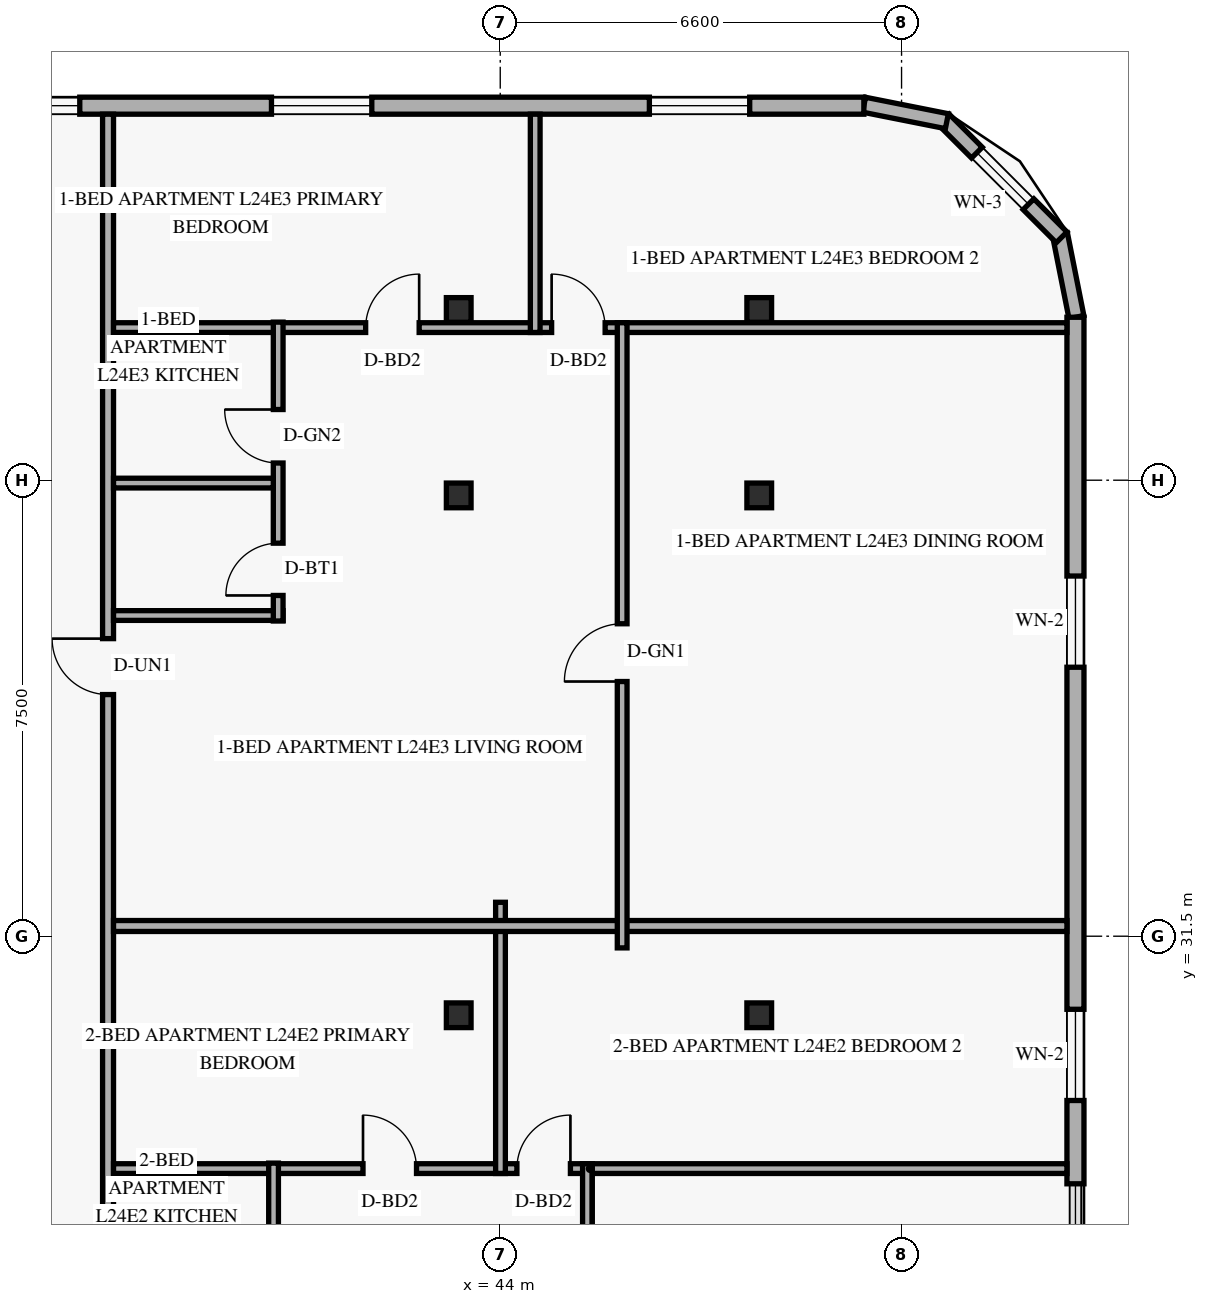
"""IFC4 building model, lengths in metres.
Left out: names, types, materials, properties, quantities, classifications, styles, units other than length and angle.
Written with IfcOpenShell. Run it as: python <this file> out.ifc"""

import sys

from ifc_helpers import new_model, si_unit, direction, frame, frame_2d, origin, origin_2d, place, context, subcontext, project, spatial, rectangle, hollow_rectangle, extrude, element, fill, save


model = new_model("IFC4")
c1 = context("Model", 3, precision=1e-05, world=origin(), true_north=direction((0.0, 1.0)))
c2 = subcontext(c1, "Body", "Model", "MODEL_VIEW")
j1 = project(units=[si_unit("LENGTHUNIT", "METRE"), si_unit("PLANEANGLEUNIT", "RADIAN")], contexts=[c1])
p1 = place(None, origin())
s1 = spatial("IfcSite", under=j1, at=p1, CompositionType="ELEMENT")
p2 = place(p1, origin())
s2 = spatial("IfcBuilding", under=s1, at=p2, CompositionType="ELEMENT")
p3 = place(p2, frame((0.0, 0.0, 94.8)))
s3 = spatial("IfcBuildingStorey", under=s2, at=p3, CompositionType="ELEMENT", Elevation=94.8)
for number, where, z_axis, x_axis in (
    (1, (43.254, 30.2, 0.0), (0.035, 0.0, 0.999), (0.0, 1.0, 0.0)),
    (2, (43.254, 38.75, 0.0), (0.035, 0.0, 0.999), (0.0, 1.0, 0.0)),
    (3, (43.254, 41.8, 0.0), (0.035, 0.0, 0.999), (0.0, 1.0, 0.0)),
):
    element("IfcColumn", number, at=place(p3, frame(where, z_axis=z_axis, x_axis=x_axis)), inside=s3, PredefinedType="COLUMN", context=c2, shape_type="SweptSolid", body=[
        extrude(hollow_rectangle(XDim=0.406, YDim=0.406, WallThickness=0.016, at=origin_2d()), origin(), (0.0, 0.0, 1.0), 3.602),
    ])
for number, where, z_axis, x_axis in (
    (4, (48.155, 30.2, 0.0), (0.058, 0.0, 0.998), (0.0, 1.0, 0.0)),
    (5, (48.155, 38.75, 0.0), (0.058, 0.0, 0.998), (0.0, 1.0, 0.0)),
    (6, (48.155, 41.8, 0.0), (0.058, 0.0, 0.998), (0.0, 1.0, 0.0)),
):
    element("IfcColumn", number, at=place(p3, frame(where, z_axis=z_axis, x_axis=x_axis)), inside=s3, PredefinedType="COLUMN", context=c2, shape_type="SweptSolid", body=[
        extrude(hollow_rectangle(XDim=0.406, YDim=0.406, WallThickness=0.016, at=origin_2d()), origin(), (0.0, 0.0, 1.0), 3.606),
    ])
p4 = place(p3, frame((53.476, 41.684, 0.0), z_axis=(0.0, 0.0, 1.0), x_axis=(-0.195000137217, 0.980803214965, 0.0)))
e7 = element("IfcWall", 7, at=p4, inside=s3, PredefinedType="SOLIDWALL", context=c2, shape_type="SweptSolid", body=[
    extrude(rectangle(XDim=1.388, YDim=0.25, at=frame_2d((0.694, 0.0))), origin(), (0.0, 0.0, 1.0), 3.35),
])
p5 = place(p3, frame((53.232, 42.995, 0.0), z_axis=(0.0, 0.0, 1.0), x_axis=(-0.707151344399, 0.707062215165, 0.0)))
e8 = element("IfcWall", 8, at=p5, inside=s3, PredefinedType="SOLIDWALL", context=c2, shape_type="SweptSolid", body=[
    extrude(rectangle(XDim=2.739, YDim=0.25, at=frame_2d((1.37, 0.0))), origin(), (0.0, 0.0, 1.0), 3.35),
])
p6 = place(p5, frame((0.77, 0.0, 0.85)))
e9 = element("IfcOpeningElement", 9, at=p6, cuts=e8, PredefinedType="OPENING", context=c2, shape_type="SweptSolid", body=[
    extrude(rectangle(XDim=1.2, YDim=1.5, at=frame_2d((0.6, 0.75))), frame((0.0, 0.135, 0.0), z_axis=(0.0, -1.0, 0.0), x_axis=(1.0, 0.0, 0.0)), (0.0, 0.0, 1.0), 0.27),
])
p7 = place(p3, frame((51.345, 44.905, 0.0), z_axis=(0.0, 0.0, 1.0), x_axis=(-0.980809899341, 0.19496651342, 0.0)))
e10 = element("IfcWall", 10, at=p7, inside=s3, PredefinedType="SOLIDWALL", context=c2, shape_type="SweptSolid", body=[
    extrude(rectangle(XDim=1.389, YDim=0.25, at=frame_2d((0.694, 0.0))), origin(), (0.0, 0.0, 1.0), 3.35),
])
p8 = place(p3, frame((53.46, 27.428, 0.0), z_axis=(0.0, 0.0, 1.0), x_axis=(0.0, 1.0, 0.0)))
e11 = element("IfcWall", 11, at=p8, inside=s3, PredefinedType="SOLIDWALL", context=c2, shape_type="SweptSolid", body=[
    extrude(rectangle(XDim=14.252, YDim=0.28, at=frame_2d((7.126, 0.0))), origin(), (0.0, 0.0, 1.0), 3.35),
])
p9 = place(p8, frame((1.37, 0.0, 0.85)))
e12 = element("IfcOpeningElement", 12, at=p9, cuts=e11, PredefinedType="OPENING", context=c2, shape_type="SweptSolid", body=[
    extrude(rectangle(XDim=1.5, YDim=1.55, at=frame_2d((0.75, 0.775))), frame((0.0, 0.15, 0.0), z_axis=(0.0, -1.0, 0.0), x_axis=(1.0, 0.0, 0.0)), (0.0, 0.0, 1.0), 0.3),
])
p10 = place(p8, frame((8.496, 0.0, 0.85)))
e13 = element("IfcOpeningElement", 13, at=p10, cuts=e11, PredefinedType="OPENING", context=c2, shape_type="SweptSolid", body=[
    extrude(rectangle(XDim=1.5, YDim=1.55, at=frame_2d((0.75, 0.775))), frame((0.0, 0.15, 0.0), z_axis=(0.0, -1.0, 0.0), x_axis=(1.0, 0.0, 0.0)), (0.0, 0.0, 1.0), 0.3),
])
p11 = place(p3, frame((49.98, 45.16, 0.0), z_axis=(0.0, 0.0, 1.0), x_axis=(-1.0, 0.0, 0.0)))
e14 = element("IfcWall", 14, at=p11, inside=s3, PredefinedType="SOLIDWALL", context=c2, shape_type="SweptSolid", body=[
    extrude(rectangle(XDim=36.56, YDim=0.28, at=frame_2d((18.28, 0.0))), origin(), (0.0, 0.0, 1.0), 3.35),
])
p12 = place(p11, frame((31.62, 0.0, 0.85)))
e15 = element("IfcOpeningElement", 15, at=p12, cuts=e14, PredefinedType="OPENING", context=c2, shape_type="SweptSolid", body=[
    extrude(rectangle(XDim=1.65, YDim=1.6, at=frame_2d((0.825, 0.8))), frame((0.0, 0.15, 0.0), z_axis=(0.0, -1.0, 0.0), x_axis=(1.0, 0.0, 0.0)), (0.0, 0.0, 1.0), 0.3),
])
p13 = place(p11, frame((26.68, 0.0, 0.85)))
e16 = element("IfcOpeningElement", 16, at=p13, cuts=e14, PredefinedType="OPENING", context=c2, shape_type="SweptSolid", body=[
    extrude(rectangle(XDim=1.2, YDim=1.5, at=frame_2d((0.6, 0.75))), frame((0.0, 0.15, 0.0), z_axis=(0.0, -1.0, 0.0), x_axis=(1.0, 0.0, 0.0)), (0.0, 0.0, 1.0), 0.3),
])
p14 = place(p11, frame((22.312, 0.0, 0.85)))
e17 = element("IfcOpeningElement", 17, at=p14, cuts=e14, PredefinedType="OPENING", context=c2, shape_type="SweptSolid", body=[
    extrude(rectangle(XDim=1.65, YDim=1.6, at=frame_2d((0.825, 0.8))), frame((0.0, 0.15, 0.0), z_axis=(0.0, -1.0, 0.0), x_axis=(1.0, 0.0, 0.0)), (0.0, 0.0, 1.0), 0.3),
])
p15 = place(p11, frame((16.477, 0.0, 0.85)))
e18 = element("IfcOpeningElement", 18, at=p15, cuts=e14, PredefinedType="OPENING", context=c2, shape_type="SweptSolid", body=[
    extrude(rectangle(XDim=1.65, YDim=1.6, at=frame_2d((0.825, 0.8))), frame((0.0, 0.15, 0.0), z_axis=(0.0, -1.0, 0.0), x_axis=(1.0, 0.0, 0.0)), (0.0, 0.0, 1.0), 0.3),
])
p16 = place(p11, frame((12.895, 0.0, 0.85)))
e19 = element("IfcOpeningElement", 19, at=p16, cuts=e14, PredefinedType="OPENING", context=c2, shape_type="SweptSolid", body=[
    extrude(rectangle(XDim=1.2, YDim=1.5, at=frame_2d((0.6, 0.75))), frame((0.0, 0.15, 0.0), z_axis=(0.0, -1.0, 0.0), x_axis=(1.0, 0.0, 0.0)), (0.0, 0.0, 1.0), 0.3),
])
p17 = place(p11, frame((8.092, 0.0, 0.85)))
e20 = element("IfcOpeningElement", 20, at=p17, cuts=e14, PredefinedType="OPENING", context=c2, shape_type="SweptSolid", body=[
    extrude(rectangle(XDim=1.65, YDim=1.6, at=frame_2d((0.825, 0.8))), frame((0.0, 0.15, 0.0), z_axis=(0.0, -1.0, 0.0), x_axis=(1.0, 0.0, 0.0)), (0.0, 0.0, 1.0), 0.3),
])
p18 = place(p11, frame((1.877, 0.0, 0.85)))
e21 = element("IfcOpeningElement", 21, at=p18, cuts=e14, PredefinedType="OPENING", context=c2, shape_type="SweptSolid", body=[
    extrude(rectangle(XDim=1.65, YDim=1.6, at=frame_2d((0.825, 0.8))), frame((0.0, 0.15, 0.0), z_axis=(0.0, -1.0, 0.0), x_axis=(1.0, 0.0, 0.0)), (0.0, 0.0, 1.0), 0.3),
])
p19 = place(p3, frame((37.55, 2.98, 0.0), z_axis=(0.0, 0.0, 1.0), x_axis=(0.0, 1.0, 0.0)))
e22 = element("IfcWall", 22, at=p19, inside=s3, PredefinedType="STANDARD", context=c2, shape_type="SweptSolid", body=[
    extrude(rectangle(XDim=42.04, YDim=0.18, at=frame_2d((21.02, 0.0))), origin(), (0.0, 0.0, 1.0), 2.721),
])
p20 = place(p19, frame((8.264, 0.0, 0.0)))
e23 = element("IfcOpeningElement", 23, at=p20, cuts=e22, PredefinedType="OPENING", context=c2, shape_type="SweptSolid", body=[
    extrude(rectangle(XDim=0.92, YDim=2.15, at=frame_2d((0.46, 1.075))), frame((0.0, 0.1, 0.0), z_axis=(0.0, -1.0, 0.0), x_axis=(1.0, 0.0, 0.0)), (0.0, 0.0, 1.0), 0.2),
])
p21 = place(p19, frame((18.691, 0.0, 0.0)))
e24 = element("IfcOpeningElement", 24, at=p21, cuts=e22, PredefinedType="OPENING", context=c2, shape_type="SweptSolid", body=[
    extrude(rectangle(XDim=0.92, YDim=2.15, at=frame_2d((0.46, 1.075))), frame((0.0, 0.1, 0.0), z_axis=(0.0, -1.0, 0.0), x_axis=(1.0, 0.0, 0.0)), (0.0, 0.0, 1.0), 0.2),
])
p22 = place(p19, frame((32.494, 0.0, 0.0)))
e25 = element("IfcOpeningElement", 25, at=p22, cuts=e22, PredefinedType="OPENING", context=c2, shape_type="SweptSolid", body=[
    extrude(rectangle(XDim=0.92, YDim=2.15, at=frame_2d((0.46, 1.075))), frame((0.0, 0.1, 0.0), z_axis=(0.0, -1.0, 0.0), x_axis=(1.0, 0.0, 0.0)), (0.0, 0.0, 1.0), 0.2),
])
p23 = place(p3, frame((37.64, 27.678, 0.0), z_axis=(0.0, 0.0, 1.0), x_axis=(1.0, 0.0, 0.0)))
e26 = element("IfcWall", 26, at=p23, inside=s3, PredefinedType="PARTITIONING", context=c2, shape_type="SweptSolid", body=[
    extrude(rectangle(XDim=15.68, YDim=0.16, at=frame_2d((7.84, 0.0))), origin(), (0.0, 0.0, 1.0), 2.721),
])
p24 = place(p23, frame((4.103, 0.0, 0.0)))
e27 = element("IfcOpeningElement", 27, at=p24, cuts=e26, PredefinedType="OPENING", context=c2, shape_type="SweptSolid", body=[
    extrude(rectangle(XDim=0.88, YDim=2.14, at=frame_2d((0.44, 1.07))), frame((0.0, 0.09, 0.0), z_axis=(0.0, -1.0, 0.0), x_axis=(1.0, 0.0, 0.0)), (0.0, 0.0, 1.0), 0.18),
])
p25 = place(p23, frame((6.634, 0.0, 0.0)))
e28 = element("IfcOpeningElement", 28, at=p25, cuts=e26, PredefinedType="OPENING", context=c2, shape_type="SweptSolid", body=[
    extrude(rectangle(XDim=0.88, YDim=2.14, at=frame_2d((0.44, 1.07))), frame((0.0, 0.09, 0.0), z_axis=(0.0, -1.0, 0.0), x_axis=(1.0, 0.0, 0.0)), (0.0, 0.0, 1.0), 0.18),
])
p26 = place(p3, frame((40.272, 22.881, 0.0), z_axis=(0.0, 0.0, 1.0), x_axis=(0.0, 1.0, 0.0)))
e29 = element("IfcWall", 29, at=p26, inside=s3, PredefinedType="PLUMBINGWALL", context=c2, shape_type="SweptSolid", body=[
    extrude(rectangle(XDim=4.887, YDim=0.16, at=frame_2d((2.443, 0.0))), origin(), (0.0, 0.0, 1.0), 3.35),
])
p27 = place(p26, frame((0.42, 0.0, 0.0)))
e30 = element("IfcOpeningElement", 30, at=p27, cuts=e29, PredefinedType="OPENING", context=c2, shape_type="SweptSolid", body=[
    extrude(rectangle(XDim=0.86, YDim=2.12, at=frame_2d((0.43, 1.06))), frame((0.0, 0.09, 0.0), z_axis=(0.0, -1.0, 0.0), x_axis=(1.0, 0.0, 0.0)), (0.0, 0.0, 1.0), 0.18),
])
p28 = place(p26, frame((2.585, 0.0, 0.0)))
e31 = element("IfcOpeningElement", 31, at=p28, cuts=e29, PredefinedType="OPENING", context=c2, shape_type="SweptSolid", body=[
    extrude(rectangle(XDim=0.88, YDim=2.12, at=frame_2d((0.44, 1.06))), frame((0.0, 0.09, 0.0), z_axis=(0.0, -1.0, 0.0), x_axis=(1.0, 0.0, 0.0)), (0.0, 0.0, 1.0), 0.18),
])
p29 = place(p3, frame((45.434, 16.824, 0.0), z_axis=(0.0, 0.0, 1.0), x_axis=(0.0, 1.0, 0.0)))
e32 = element("IfcWall", 32, at=p29, inside=s3, PredefinedType="PARTITIONING", context=c2, shape_type="SweptSolid", body=[
    extrude(rectangle(XDim=10.934, YDim=0.16, at=frame_2d((5.467, 0.0))), origin(), (0.0, 0.0, 1.0), 2.721),
])
p30 = place(p29, frame((4.707, 0.0, 0.0)))
e33 = element("IfcOpeningElement", 33, at=p30, cuts=e32, PredefinedType="OPENING", context=c2, shape_type="SweptSolid", body=[
    extrude(rectangle(XDim=0.95, YDim=2.15, at=frame_2d((0.475, 1.075))), frame((0.0, 0.09, 0.0), z_axis=(0.0, -1.0, 0.0), x_axis=(1.0, 0.0, 0.0)), (0.0, 0.0, 1.0), 0.18),
])
p31 = place(p3, frame((44.004, 27.598, 0.0), z_axis=(0.0, 0.0, 1.0), x_axis=(0.0, 1.0, 0.0)))
e34 = element("IfcWall", 34, at=p31, inside=s3, PredefinedType="PARTITIONING", context=c2, shape_type="SweptSolid", body=[
    extrude(rectangle(XDim=4.46, YDim=0.16, at=frame_2d((2.23, 0.0))), origin(), (0.0, 0.0, 1.0), 2.721),
])
p32 = place(p3, frame((37.64, 31.668, 0.0), z_axis=(0.0, 0.0, 1.0), x_axis=(1.0, 0.0, 0.0)))
e35 = element("IfcWall", 35, at=p32, inside=s3, PredefinedType="PARTITIONING", context=c2, shape_type="SweptSolid", body=[
    extrude(rectangle(XDim=15.68, YDim=0.18, at=frame_2d((7.84, 0.0))), origin(), (0.0, 0.0, 1.0), 2.721),
])
p33 = place(p3, frame((37.64, 41.51, 0.0), z_axis=(0.0, 0.0, 1.0), x_axis=(1.0, 0.0, 0.0)))
e36 = element("IfcWall", 36, at=p33, inside=s3, PredefinedType="PARTITIONING", context=c2, shape_type="SweptSolid", body=[
    extrude(rectangle(XDim=15.68, YDim=0.16, at=frame_2d((7.84, 0.0))), origin(), (0.0, 0.0, 1.0), 2.721),
])
p34 = place(p33, frame((4.146, 0.0, 0.0)))
e37 = element("IfcOpeningElement", 37, at=p34, cuts=e36, PredefinedType="OPENING", context=c2, shape_type="SweptSolid", body=[
    extrude(rectangle(XDim=0.88, YDim=2.14, at=frame_2d((0.44, 1.07))), frame((0.0, 0.09, 0.0), z_axis=(0.0, -1.0, 0.0), x_axis=(1.0, 0.0, 0.0)), (0.0, 0.0, 1.0), 0.18),
])
p35 = place(p33, frame((7.205, 0.0, 0.0)))
e38 = element("IfcOpeningElement", 38, at=p35, cuts=e36, PredefinedType="OPENING", context=c2, shape_type="SweptSolid", body=[
    extrude(rectangle(XDim=0.88, YDim=2.14, at=frame_2d((0.44, 1.07))), frame((0.0, 0.09, 0.0), z_axis=(0.0, -1.0, 0.0), x_axis=(1.0, 0.0, 0.0)), (0.0, 0.0, 1.0), 0.18),
])
p36 = place(p3, frame((37.64, 36.774, 0.0), z_axis=(0.0, 0.0, 1.0), x_axis=(1.0, 0.0, 0.0)))
e39 = element("IfcWall", 39, at=p36, inside=s3, PredefinedType="PLUMBINGWALL", context=c2, shape_type="SweptSolid", body=[
    extrude(rectangle(XDim=2.788, YDim=0.16, at=frame_2d((1.394, 0.0))), origin(), (0.0, 0.0, 1.0), 3.35),
])
p37 = place(p3, frame((40.348, 36.685, 0.0), z_axis=(0.0, 0.0, 1.0), x_axis=(0.0, 1.0, 0.0)))
e40 = element("IfcWall", 40, at=p37, inside=s3, PredefinedType="PLUMBINGWALL", context=c2, shape_type="SweptSolid", body=[
    extrude(rectangle(XDim=4.916, YDim=0.16, at=frame_2d((2.458, 0.0))), origin(), (0.0, 0.0, 1.0), 2.721),
])
p38 = place(p37, frame((0.42, 0.0, 0.0)))
e41 = element("IfcOpeningElement", 41, at=p38, cuts=e40, PredefinedType="OPENING", context=c2, shape_type="SweptSolid", body=[
    extrude(rectangle(XDim=0.86, YDim=2.12, at=frame_2d((0.43, 1.06))), frame((0.0, 0.09, 0.0), z_axis=(0.0, -1.0, 0.0), x_axis=(1.0, 0.0, 0.0)), (0.0, 0.0, 1.0), 0.18),
])
p39 = place(p37, frame((2.598, 0.0, 0.0)))
e42 = element("IfcOpeningElement", 42, at=p39, cuts=e40, PredefinedType="OPENING", context=c2, shape_type="SweptSolid", body=[
    extrude(rectangle(XDim=0.88, YDim=2.12, at=frame_2d((0.44, 1.06))), frame((0.0, 0.09, 0.0), z_axis=(0.0, -1.0, 0.0), x_axis=(1.0, 0.0, 0.0)), (0.0, 0.0, 1.0), 0.18),
])
p40 = place(p3, frame((37.64, 38.953, 0.0), z_axis=(0.0, 0.0, 1.0), x_axis=(1.0, 0.0, 0.0)))
e43 = element("IfcWall", 43, at=p40, inside=s3, PredefinedType="PLUMBINGWALL", context=c2, shape_type="SweptSolid", body=[
    extrude(rectangle(XDim=2.628, YDim=0.16, at=frame_2d((1.314, 0.0))), origin(), (0.0, 0.0, 1.0), 2.721),
])
p41 = place(p3, frame((46.005, 31.308, 0.0), z_axis=(0.0, 0.0, 1.0), x_axis=(0.0, 1.0, 0.0)))
e44 = element("IfcWall", 44, at=p41, inside=s3, PredefinedType="PARTITIONING", context=c2, shape_type="SweptSolid", body=[
    extrude(rectangle(XDim=10.282, YDim=0.16, at=frame_2d((5.141, 0.0))), origin(), (0.0, 0.0, 1.0), 2.721),
])
p42 = place(p41, frame((4.381, 0.0, 0.0)))
e45 = element("IfcOpeningElement", 45, at=p42, cuts=e44, PredefinedType="OPENING", context=c2, shape_type="SweptSolid", body=[
    extrude(rectangle(XDim=0.95, YDim=2.15, at=frame_2d((0.475, 1.075))), frame((0.0, 0.09, 0.0), z_axis=(0.0, -1.0, 0.0), x_axis=(1.0, 0.0, 0.0)), (0.0, 0.0, 1.0), 0.18),
])
p43 = place(p3, frame((44.575, 41.43, 0.0), z_axis=(0.0, 0.0, 1.0), x_axis=(0.0, 1.0, 0.0)))
e46 = element("IfcWall", 46, at=p43, inside=s3, PredefinedType="PARTITIONING", context=c2, shape_type="SweptSolid", body=[
    extrude(rectangle(XDim=3.59, YDim=0.16, at=frame_2d((1.795, 0.0))), origin(), (0.0, 0.0, 1.0), 2.799),
])
p44 = place(p6, origin())
e47 = element("IfcWindow", 47, at=p44, inside=s3, PartitioningType="SINGLE_PANEL", PredefinedType="WINDOW", context=c2, shape_type="SweptSolid", body=[
    extrude(rectangle(XDim=1.2, YDim=1.5, at=frame_2d((0.6, 0.75))), frame((0.0, 0.03, 0.0), z_axis=(0.0, -1.0, 0.0), x_axis=(1.0, 0.0, 0.0)), (0.0, 0.0, 1.0), 0.06),
])
fill(e9, e47)
p45 = place(p9, origin())
e48 = element("IfcWindow", 48, at=p45, inside=s3, PartitioningType="SINGLE_PANEL", PredefinedType="WINDOW", context=c2, shape_type="SweptSolid", body=[
    extrude(rectangle(XDim=1.5, YDim=1.55, at=frame_2d((0.75, 0.775))), frame((0.0, 0.03, 0.0), z_axis=(0.0, -1.0, 0.0), x_axis=(1.0, 0.0, 0.0)), (0.0, 0.0, 1.0), 0.06),
])
fill(e12, e48)
p46 = place(p10, origin())
e49 = element("IfcWindow", 49, at=p46, inside=s3, PartitioningType="SINGLE_PANEL", PredefinedType="WINDOW", context=c2, shape_type="SweptSolid", body=[
    extrude(rectangle(XDim=1.5, YDim=1.55, at=frame_2d((0.75, 0.775))), frame((0.0, 0.03, 0.0), z_axis=(0.0, -1.0, 0.0), x_axis=(1.0, 0.0, 0.0)), (0.0, 0.0, 1.0), 0.06),
])
fill(e13, e49)
p47 = place(p16, origin())
e50 = element("IfcWindow", 50, at=p47, inside=s3, PartitioningType="SINGLE_PANEL", PredefinedType="WINDOW", context=c2, shape_type="SweptSolid", body=[
    extrude(rectangle(XDim=1.2, YDim=1.5, at=frame_2d((0.6, 0.75))), frame((0.0, 0.03, 0.0), z_axis=(0.0, -1.0, 0.0), x_axis=(1.0, 0.0, 0.0)), (0.0, 0.0, 1.0), 0.06),
])
fill(e19, e50)
p48 = place(p17, origin())
e51 = element("IfcWindow", 51, at=p48, inside=s3, PartitioningType="SINGLE_PANEL", PredefinedType="WINDOW", context=c2, shape_type="SweptSolid", body=[
    extrude(rectangle(XDim=1.65, YDim=1.6, at=frame_2d((0.825, 0.8))), frame((0.0, 0.03, 0.0), z_axis=(0.0, -1.0, 0.0), x_axis=(1.0, 0.0, 0.0)), (0.0, 0.0, 1.0), 0.06),
])
fill(e20, e51)
p49 = place(p18, origin())
e52 = element("IfcWindow", 52, at=p49, inside=s3, PartitioningType="SINGLE_PANEL", PredefinedType="WINDOW", context=c2, shape_type="SweptSolid", body=[
    extrude(rectangle(XDim=1.65, YDim=1.6, at=frame_2d((0.825, 0.8))), frame((0.0, 0.03, 0.0), z_axis=(0.0, -1.0, 0.0), x_axis=(1.0, 0.0, 0.0)), (0.0, 0.0, 1.0), 0.06),
])
fill(e21, e52)
p50 = place(p24, origin())
e53 = element("IfcDoor", 53, at=p50, inside=s3, OperationType="SINGLE_SWING_LEFT", PredefinedType="DOOR", context=c2, shape_type="SweptSolid", body=[
    extrude(rectangle(XDim=0.88, YDim=2.14, at=frame_2d((0.44, 1.07))), frame((0.0, 0.025, 0.0), z_axis=(0.0, -1.0, 0.0), x_axis=(1.0, 0.0, 0.0)), (0.0, 0.0, 1.0), 0.05),
])
fill(e27, e53)
p51 = place(p25, origin())
e54 = element("IfcDoor", 54, at=p51, inside=s3, OperationType="SINGLE_SWING_RIGHT", PredefinedType="DOOR", context=c2, shape_type="SweptSolid", body=[
    extrude(rectangle(XDim=0.88, YDim=2.14, at=frame_2d((0.44, 1.07))), frame((0.0, 0.025, 0.0), z_axis=(0.0, -1.0, 0.0), x_axis=(1.0, 0.0, 0.0)), (0.0, 0.0, 1.0), 0.05),
])
fill(e28, e54)
p52 = place(p42, origin())
e55 = element("IfcDoor", 55, at=p52, inside=s3, OperationType="SINGLE_SWING_LEFT", PredefinedType="DOOR", context=c2, shape_type="SweptSolid", body=[
    extrude(rectangle(XDim=0.95, YDim=2.15, at=frame_2d((0.475, 1.075))), frame((0.0, 0.025, 0.0), z_axis=(0.0, -1.0, 0.0), x_axis=(1.0, 0.0, 0.0)), (0.0, 0.0, 1.0), 0.05),
])
fill(e45, e55)
p53 = place(p22, origin())
e56 = element("IfcDoor", 56, at=p53, inside=s3, OperationType="SINGLE_SWING_RIGHT", PredefinedType="DOOR", context=c2, shape_type="SweptSolid", body=[
    extrude(rectangle(XDim=0.92, YDim=2.15, at=frame_2d((0.46, 1.075))), frame((0.0, 0.025, 0.0), z_axis=(0.0, -1.0, 0.0), x_axis=(1.0, 0.0, 0.0)), (0.0, 0.0, 1.0), 0.05),
])
fill(e25, e56)
p54 = place(p38, origin())
e57 = element("IfcDoor", 57, at=p54, inside=s3, OperationType="SINGLE_SWING_LEFT", PredefinedType="DOOR", context=c2, shape_type="SweptSolid", body=[
    extrude(rectangle(XDim=0.86, YDim=2.12, at=frame_2d((0.43, 1.06))), frame((0.0, 0.025, 0.0), z_axis=(0.0, -1.0, 0.0), x_axis=(1.0, 0.0, 0.0)), (0.0, 0.0, 1.0), 0.05),
])
fill(e41, e57)
p55 = place(p39, origin())
e58 = element("IfcDoor", 58, at=p55, inside=s3, OperationType="SINGLE_SWING_RIGHT", PredefinedType="DOOR", context=c2, shape_type="SweptSolid", body=[
    extrude(rectangle(XDim=0.88, YDim=2.12, at=frame_2d((0.44, 1.06))), frame((0.0, 0.025, 0.0), z_axis=(0.0, -1.0, 0.0), x_axis=(1.0, 0.0, 0.0)), (0.0, 0.0, 1.0), 0.05),
])
fill(e42, e58)
p56 = place(p34, origin())
e59 = element("IfcDoor", 59, at=p56, inside=s3, OperationType="SINGLE_SWING_RIGHT", PredefinedType="DOOR", context=c2, shape_type="SweptSolid", body=[
    extrude(rectangle(XDim=0.88, YDim=2.14, at=frame_2d((0.44, 1.07))), frame((0.0, 0.025, 0.0), z_axis=(0.0, -1.0, 0.0), x_axis=(1.0, 0.0, 0.0)), (0.0, 0.0, 1.0), 0.05),
])
fill(e37, e59)
p57 = place(p35, origin())
e60 = element("IfcDoor", 60, at=p57, inside=s3, OperationType="SINGLE_SWING_LEFT", PredefinedType="DOOR", context=c2, shape_type="SweptSolid", body=[
    extrude(rectangle(XDim=0.88, YDim=2.14, at=frame_2d((0.44, 1.07))), frame((0.0, 0.025, 0.0), z_axis=(0.0, -1.0, 0.0), x_axis=(1.0, 0.0, 0.0)), (0.0, 0.0, 1.0), 0.05),
])
fill(e38, e60)
save(model, sys.argv[1])
